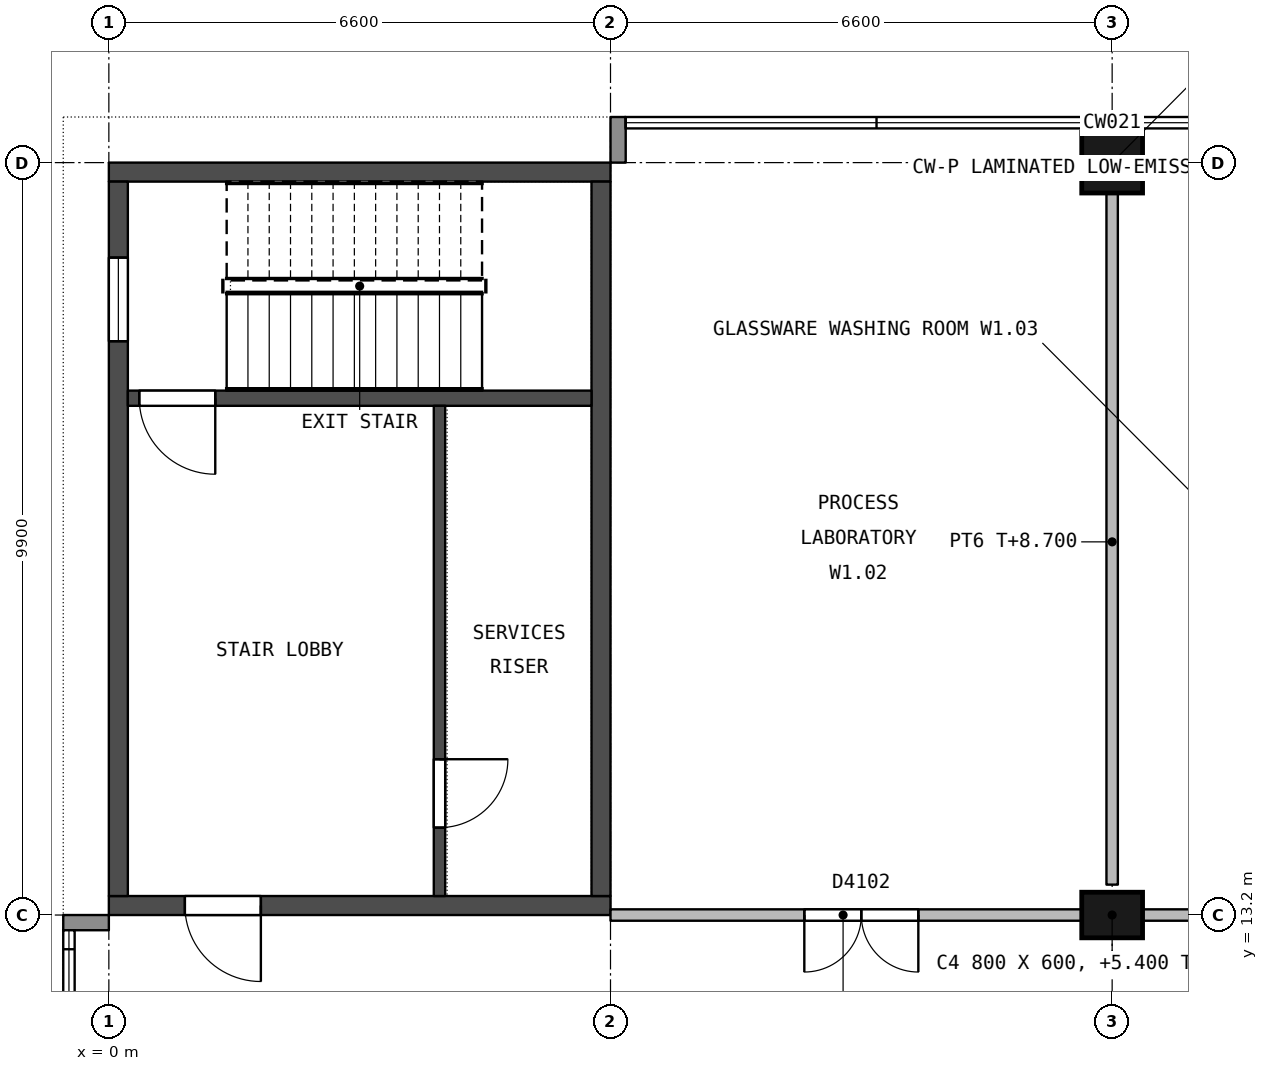
"""IFC4 building model, lengths in metres.
Left out: names, types, materials, properties, quantities, classifications, styles, units other than length and angle.
Written with IfcOpenShell. Run it as: python <this file> out.ifc"""

import sys

from ifc_helpers import new_model, si_unit, direction, frame, frame_2d, origin, origin_2d, place, context, subcontext, project, spatial, rectangle, extrude, element, fill, save


model = new_model("IFC4")
c1 = context("Model", 3, precision=1e-05, world=origin(), true_north=direction((0.0, 1.0)))
c2 = subcontext(c1, "Body", "Model", "MODEL_VIEW")
j1 = project(units=[si_unit("LENGTHUNIT", "METRE"), si_unit("PLANEANGLEUNIT", "RADIAN")], contexts=[c1])
p1 = place(None, origin())
s1 = spatial("IfcSite", under=j1, at=p1, CompositionType="ELEMENT")
p2 = place(p1, origin())
s2 = spatial("IfcBuilding", under=s1, at=p2, CompositionType="ELEMENT")
p3 = place(p2, frame((0.0, 0.0, 5.4)))
s3 = spatial("IfcBuildingStorey", under=s2, at=p3, CompositionType="ELEMENT", Elevation=5.4)
p4 = place(p3, frame((13.2, 13.2, 0.0), z_axis=(0.0, 0.0, 1.0), x_axis=(1.0, 0.0, 0.0)))
e1 = element("IfcColumn", 1, at=p4, inside=s3, PredefinedType="COLUMN", context=c2, shape_type="SweptSolid", body=[
    extrude(rectangle(XDim=0.8, YDim=0.6, at=origin_2d()), origin(), (0.0, 0.0, 1.0), 4.5),
])
p5 = place(p3, frame((13.2, 23.1, 0.0), z_axis=(0.0, 0.0, 1.0), x_axis=(1.0, 0.0, 0.0)))
e2 = element("IfcColumn", 2, at=p5, inside=s3, PredefinedType="COLUMN", context=c2, shape_type="SweptSolid", body=[
    extrude(rectangle(XDim=0.8, YDim=0.8, at=origin_2d()), origin(), (0.0, 0.0, 1.0), 4.5),
])
p6 = place(p3, frame((0.0, 13.325, 0.0), z_axis=(0.0, 0.0, 1.0), x_axis=(1.0, 0.0, 0.0)))
e3 = element("IfcWall", 3, at=p6, inside=s3, PredefinedType="SHEAR", context=c2, shape_type="SweptSolid", body=[
    extrude(rectangle(XDim=6.6, YDim=0.25, at=frame_2d((3.3, 0.0))), origin(), (0.0, 0.0, 1.0), 4.2),
])
p7 = place(p6, frame((1.0, 0.0, 0.0)))
e4 = element("IfcOpeningElement", 4, at=p7, cuts=e3, PredefinedType="OPENING", context=c2, shape_type="SweptSolid", body=[
    extrude(rectangle(XDim=1.0, YDim=2.1, at=frame_2d((0.5, 1.05))), frame((0.0, 0.135, 0.0), z_axis=(0.0, -1.0, 0.0), x_axis=(1.0, 0.0, 0.0)), (0.0, 0.0, 1.0), 0.27),
])
p8 = place(p3, frame((0.0, 22.975, 0.0), z_axis=(0.0, 0.0, 1.0), x_axis=(1.0, 0.0, 0.0)))
e5 = element("IfcWall", 5, at=p8, inside=s3, PredefinedType="SHEAR", context=c2, shape_type="SweptSolid", body=[
    extrude(rectangle(XDim=6.6, YDim=0.25, at=frame_2d((3.3, 0.0))), origin(), (0.0, 0.0, 1.0), 4.2),
])
p9 = place(p3, frame((0.125, 13.45, 0.0), z_axis=(0.0, 0.0, 1.0), x_axis=(0.0, 1.0, 0.0)))
e6 = element("IfcWall", 6, at=p9, inside=s3, PredefinedType="SHEAR", context=c2, shape_type="SweptSolid", body=[
    extrude(rectangle(XDim=9.4, YDim=0.25, at=frame_2d((4.7, 0.0))), origin(), (0.0, 0.0, 1.0), 4.2),
])
p10 = place(p9, frame((7.3, 0.0, 0.7)))
e7 = element("IfcOpeningElement", 7, at=p10, cuts=e6, PredefinedType="OPENING", context=c2, shape_type="SweptSolid", body=[
    extrude(rectangle(XDim=1.1, YDim=1.5, at=frame_2d((0.55, 0.75))), frame((0.0, 0.135, 0.0), z_axis=(0.0, -1.0, 0.0), x_axis=(1.0, 0.0, 0.0)), (0.0, 0.0, 1.0), 0.27),
])
p11 = place(p3, frame((6.475, 13.45, 0.0), z_axis=(0.0, 0.0, 1.0), x_axis=(0.0, 1.0, 0.0)))
e8 = element("IfcWall", 8, at=p11, inside=s3, PredefinedType="SHEAR", context=c2, shape_type="SweptSolid", body=[
    extrude(rectangle(XDim=9.4, YDim=0.25, at=frame_2d((4.7, 0.0))), origin(), (0.0, 0.0, 1.0), 4.2),
])
p12 = place(p3, frame((0.25, 20.0, 0.0), z_axis=(0.0, 0.0, 1.0), x_axis=(1.0, 0.0, 0.0)))
e9 = element("IfcWall", 9, at=p12, inside=s3, PredefinedType="SHEAR", context=c2, shape_type="SweptSolid", body=[
    extrude(rectangle(XDim=6.1, YDim=0.2, at=frame_2d((3.05, 0.0))), origin(), (0.0, 0.0, 1.0), 4.2),
])
p13 = place(p12, frame((0.15, 0.0, 0.0)))
e10 = element("IfcOpeningElement", 10, at=p13, cuts=e9, PredefinedType="OPENING", context=c2, shape_type="SweptSolid", body=[
    extrude(rectangle(XDim=1.0, YDim=2.1, at=frame_2d((0.5, 1.05))), frame((0.0, 0.11, 0.0), z_axis=(0.0, -1.0, 0.0), x_axis=(1.0, 0.0, 0.0)), (0.0, 0.0, 1.0), 0.22),
])
p14 = place(p3, frame((4.35, 13.45, 0.0), z_axis=(0.0, 0.0, 1.0), x_axis=(0.0, 1.0, 0.0)))
e11 = element("IfcWall", 11, at=p14, inside=s3, PredefinedType="SHEAR", context=c2, shape_type="SweptSolid", body=[
    extrude(rectangle(XDim=6.45, YDim=0.15, at=frame_2d((3.225, 0.0))), origin(), (0.0, 0.0, 1.0), 4.2),
])
p15 = place(p14, frame((0.9, 0.0, 0.0)))
e12 = element("IfcOpeningElement", 12, at=p15, cuts=e11, PredefinedType="OPENING", context=c2, shape_type="SweptSolid", body=[
    extrude(rectangle(XDim=0.9, YDim=2.1, at=frame_2d((0.45, 1.05))), frame((0.0, 0.085, 0.0), z_axis=(0.0, -1.0, 0.0), x_axis=(1.0, 0.0, 0.0)), (0.0, 0.0, 1.0), 0.17),
])
p16 = place(p3, frame((6.7, 23.1, 0.0), z_axis=(0.0, 0.0, 1.0), x_axis=(0.0, 1.0, 0.0)))
e13 = element("IfcWall", 13, at=p16, inside=s3, PredefinedType="STANDARD", context=c2, shape_type="SweptSolid", body=[
    extrude(rectangle(XDim=0.6, YDim=0.2, at=frame_2d((0.3, 0.0))), origin(), (0.0, 0.0, 1.0), 3.5),
])
p17 = place(p3, frame((0.0, 13.1, 0.0), z_axis=(0.0, 0.0, 1.0), x_axis=(-1.0, 0.0, 0.0)))
e14 = element("IfcWall", 14, at=p17, inside=s3, PredefinedType="STANDARD", context=c2, shape_type="SweptSolid", body=[
    extrude(rectangle(XDim=0.6, YDim=0.2, at=frame_2d((0.3, 0.0))), origin(), (0.0, 0.0, 1.0), 3.5),
])
p18 = place(p3, frame((12.8, 13.2, 0.0), z_axis=(0.0, 0.0, 1.0), x_axis=(-1.0, 0.0, 0.0)))
e15 = element("IfcWall", 15, at=p18, inside=s3, PredefinedType="PARTITIONING", context=c2, shape_type="SweptSolid", body=[
    extrude(rectangle(XDim=6.2, YDim=0.15, at=frame_2d((3.1, 0.0))), origin(), (0.0, 0.0, 1.0), 3.5),
])
p19 = place(p18, frame((2.15, 0.0, 0.0)))
e16 = element("IfcOpeningElement", 16, at=p19, cuts=e15, PredefinedType="OPENING", context=c2, shape_type="SweptSolid", body=[
    extrude(rectangle(XDim=1.5, YDim=2.1, at=frame_2d((0.75, 1.05))), frame((0.0, 0.085, 0.0), z_axis=(0.0, -1.0, 0.0), x_axis=(1.0, 0.0, 0.0)), (0.0, 0.0, 1.0), 0.17),
])
p20 = place(p3, frame((16.5, 13.2, 0.0), z_axis=(0.0, 0.0, 1.0), x_axis=(-1.0, 0.0, 0.0)))
e17 = element("IfcWall", 17, at=p20, inside=s3, PredefinedType="PARTITIONING", context=c2, shape_type="SweptSolid", body=[
    extrude(rectangle(XDim=2.9, YDim=0.15, at=frame_2d((1.45, 0.0))), origin(), (0.0, 0.0, 1.0), 3.5),
])
p21 = place(p3, frame((13.2, 13.6, 0.0), z_axis=(0.0, 0.0, 1.0), x_axis=(0.0, 1.0, 0.0)))
e18 = element("IfcWall", 18, at=p21, inside=s3, PredefinedType="PARTITIONING", context=c2, shape_type="SweptSolid", body=[
    extrude(rectangle(XDim=9.1, YDim=0.15, at=frame_2d((4.55, 0.0))), origin(), (0.0, 0.0, 1.0), 3.3),
])
p22 = place(p15, origin())
e19 = element("IfcDoor", 19, at=p22, inside=s3, OperationType="SINGLE_SWING_RIGHT", PredefinedType="DOOR", context=c2, shape_type="SweptSolid", body=[
    extrude(rectangle(XDim=0.9, YDim=2.1, at=frame_2d((0.45, 1.05))), frame((0.0, 0.025, 0.0), z_axis=(0.0, -1.0, 0.0), x_axis=(1.0, 0.0, 0.0)), (0.0, 0.0, 1.0), 0.05),
])
fill(e12, e19)
p23 = place(p7, origin())
e20 = element("IfcDoor", 20, at=p23, inside=s3, OperationType="SINGLE_SWING_RIGHT", PredefinedType="DOOR", context=c2, shape_type="SweptSolid", body=[
    extrude(rectangle(XDim=1.0, YDim=2.1, at=frame_2d((0.5, 1.05))), frame((0.0, 0.025, 0.0), z_axis=(0.0, -1.0, 0.0), x_axis=(1.0, 0.0, 0.0)), (0.0, 0.0, 1.0), 0.05),
])
fill(e4, e20)
p24 = place(p13, origin())
e21 = element("IfcDoor", 21, at=p24, inside=s3, OperationType="SINGLE_SWING_RIGHT", PredefinedType="DOOR", context=c2, shape_type="SweptSolid", body=[
    extrude(rectangle(XDim=1.0, YDim=2.1, at=frame_2d((0.5, 1.05))), frame((0.0, 0.025, 0.0), z_axis=(0.0, -1.0, 0.0), x_axis=(1.0, 0.0, 0.0)), (0.0, 0.0, 1.0), 0.05),
])
fill(e10, e21)
p25 = place(p10, origin())
e22 = element("IfcWindow", 22, at=p25, inside=s3, PartitioningType="SINGLE_PANEL", PredefinedType="WINDOW", context=c2, shape_type="SweptSolid", body=[
    extrude(rectangle(XDim=1.1, YDim=1.5, at=frame_2d((0.55, 0.75))), frame((0.0, 0.03, 0.0), z_axis=(0.0, -1.0, 0.0), x_axis=(1.0, 0.0, 0.0)), (0.0, 0.0, 1.0), 0.06),
])
fill(e7, e22)
p26 = place(p19, origin())
e23 = element("IfcDoor", 23, at=p26, inside=s3, OperationType="DOUBLE_DOOR_SINGLE_SWING", PredefinedType="DOOR", context=c2, shape_type="SweptSolid", body=[
    extrude(rectangle(XDim=1.5, YDim=2.1, at=frame_2d((0.75, 1.05))), frame((0.0, 0.027, 0.0), z_axis=(0.0, -1.0, 0.0), x_axis=(1.0, 0.0, 0.0)), (0.0, 0.0, 1.0), 0.054),
])
fill(e16, e23)
save(model, sys.argv[1])
